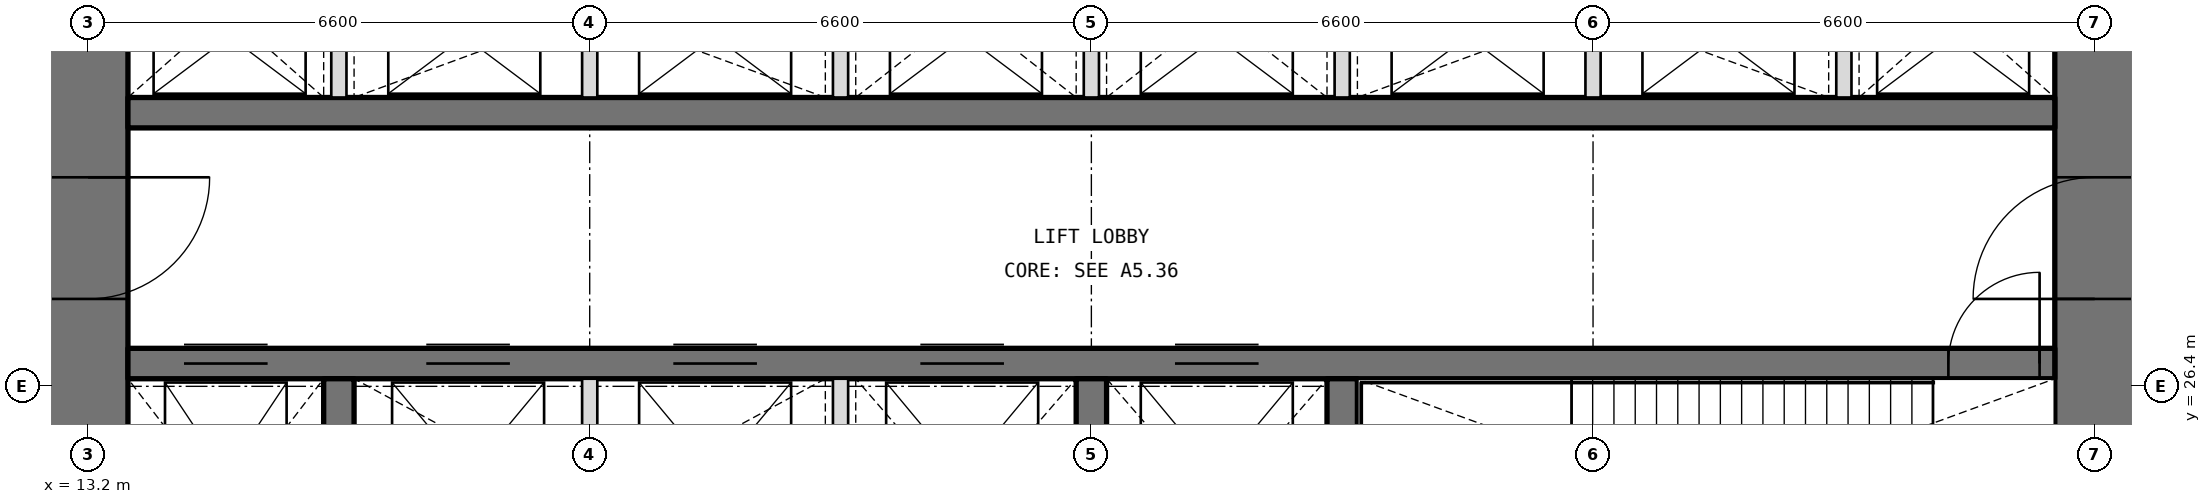
"""IFC4 building model, lengths in metres.
Left out: names, types, materials, properties, quantities, classifications, styles, units other than length and angle.
Written with IfcOpenShell. Run it as: python <this file> out.ifc"""

import sys

from ifc_helpers import new_model, si_unit, direction, frame, frame_2d, origin, place, context, subcontext, project, spatial, rectangle, extrude, element, fill, save


model = new_model("IFC4")
c1 = context("Model", 3, precision=1e-05, world=origin(), true_north=direction((0.0, 1.0)))
c2 = subcontext(c1, "Body", "Model", "MODEL_VIEW")
j1 = project(units=[si_unit("LENGTHUNIT", "METRE"), si_unit("PLANEANGLEUNIT", "RADIAN")], contexts=[c1])
p1 = place(None, origin())
s1 = spatial("IfcSite", under=j1, at=p1, CompositionType="ELEMENT")
p2 = place(p1, origin())
s2 = spatial("IfcBuilding", under=s1, at=p2, CompositionType="ELEMENT")
p3 = place(p2, frame((0.0, 0.0, 149.4)))
s3 = spatial("IfcBuildingStorey", under=s2, at=p3, CompositionType="ELEMENT", Elevation=149.4)
p4 = place(p3, frame((39.6, 13.725, 0.0), z_axis=(0.0, 0.0, 1.0), x_axis=(0.0, 1.0, 0.0)))
e1 = element("IfcWall", 1, at=p4, inside=s3, PredefinedType="SHEAR", context=c2, shape_type="SweptSolid", body=[
    extrude(rectangle(XDim=18.75, YDim=1.05, at=frame_2d((9.375, 0.0))), origin(), (0.0, 0.0, 1.0), 6.3),
])
p5 = place(p4, frame((3.025, 0.0, 0.0)))
e2 = element("IfcOpeningElement", 2, at=p5, cuts=e1, PredefinedType="OPENING", context=c2, shape_type="SweptSolid", body=[
    extrude(rectangle(XDim=1.6, YDim=2.1, at=frame_2d((0.8, 1.05))), frame((0.0, 0.535, 0.0), z_axis=(0.0, -1.0, 0.0), x_axis=(1.0, 0.0, 0.0)), (0.0, 0.0, 1.0), 1.07),
])
p6 = place(p4, frame((13.825, 0.0, 0.0)))
e3 = element("IfcOpeningElement", 3, at=p6, cuts=e1, PredefinedType="OPENING", context=c2, shape_type="SweptSolid", body=[
    extrude(rectangle(XDim=1.6, YDim=2.1, at=frame_2d((0.8, 1.05))), frame((0.0, 0.535, 0.0), z_axis=(0.0, -1.0, 0.0), x_axis=(1.0, 0.0, 0.0)), (0.0, 0.0, 1.0), 1.07),
])
p7 = place(p3, frame((13.2, 32.475, 0.0), z_axis=(0.0, 0.0, 1.0), x_axis=(0.0, -1.0, 0.0)))
e4 = element("IfcWall", 4, at=p7, inside=s3, PredefinedType="SHEAR", context=c2, shape_type="SweptSolid", body=[
    extrude(rectangle(XDim=18.75, YDim=1.05, at=frame_2d((9.375, 0.0))), origin(), (0.0, 0.0, 1.0), 6.3),
])
p8 = place(p7, frame((14.125, 0.0, 0.0)))
e5 = element("IfcOpeningElement", 5, at=p8, cuts=e4, PredefinedType="OPENING", context=c2, shape_type="SweptSolid", body=[
    extrude(rectangle(XDim=1.6, YDim=2.1, at=frame_2d((0.8, 1.05))), frame((0.0, 0.535, 0.0), z_axis=(0.0, -1.0, 0.0), x_axis=(1.0, 0.0, 0.0)), (0.0, 0.0, 1.0), 1.07),
])
p9 = place(p7, frame((3.325, 0.0, 0.0)))
e6 = element("IfcOpeningElement", 6, at=p9, cuts=e4, PredefinedType="OPENING", context=c2, shape_type="SweptSolid", body=[
    extrude(rectangle(XDim=1.6, YDim=2.1, at=frame_2d((0.8, 1.05))), frame((0.0, 0.535, 0.0), z_axis=(0.0, -1.0, 0.0), x_axis=(1.0, 0.0, 0.0)), (0.0, 0.0, 1.0), 1.07),
])
p10 = place(p3, frame((13.725, 26.7, 0.0), z_axis=(0.0, 0.0, 1.0), x_axis=(1.0, 0.0, 0.0)))
e7 = element("IfcWall", 7, at=p10, inside=s3, PredefinedType="SHEAR", context=c2, shape_type="SweptSolid", body=[
    extrude(rectangle(XDim=25.35, YDim=0.4, at=frame_2d((12.675, 0.0))), origin(), (0.0, 0.0, 1.0), 6.3),
])
p11 = place(p10, frame((23.95, 0.0, 0.0)))
e8 = element("IfcOpeningElement", 8, at=p11, cuts=e7, PredefinedType="OPENING", context=c2, shape_type="SweptSolid", body=[
    extrude(rectangle(XDim=1.2, YDim=2.1, at=frame_2d((0.6, 1.05))), frame((0.0, 0.21, 0.0), z_axis=(0.0, -1.0, 0.0), x_axis=(1.0, 0.0, 0.0)), (0.0, 0.0, 1.0), 0.42),
])
p12 = place(p10, frame((0.738, 0.0, 0.0)))
e9 = element("IfcOpeningElement", 9, at=p12, cuts=e7, PredefinedType="OPENING", context=c2, shape_type="SweptSolid", body=[
    extrude(rectangle(XDim=1.1, YDim=2.1, at=frame_2d((0.55, 1.05))), frame((0.0, 0.21, 0.0), z_axis=(0.0, -1.0, 0.0), x_axis=(1.0, 0.0, 0.0)), (0.0, 0.0, 1.0), 0.42),
])
p13 = place(p10, frame((3.925, 0.0, 0.0)))
e10 = element("IfcOpeningElement", 10, at=p13, cuts=e7, PredefinedType="OPENING", context=c2, shape_type="SweptSolid", body=[
    extrude(rectangle(XDim=1.1, YDim=2.1, at=frame_2d((0.55, 1.05))), frame((0.0, 0.21, 0.0), z_axis=(0.0, -1.0, 0.0), x_axis=(1.0, 0.0, 0.0)), (0.0, 0.0, 1.0), 0.42),
])
p14 = place(p10, frame((7.175, 0.0, 0.0)))
e11 = element("IfcOpeningElement", 11, at=p14, cuts=e7, PredefinedType="OPENING", context=c2, shape_type="SweptSolid", body=[
    extrude(rectangle(XDim=1.1, YDim=2.1, at=frame_2d((0.55, 1.05))), frame((0.0, 0.21, 0.0), z_axis=(0.0, -1.0, 0.0), x_axis=(1.0, 0.0, 0.0)), (0.0, 0.0, 1.0), 0.42),
])
p15 = place(p10, frame((10.425, 0.0, 0.0)))
e12 = element("IfcOpeningElement", 12, at=p15, cuts=e7, PredefinedType="OPENING", context=c2, shape_type="SweptSolid", body=[
    extrude(rectangle(XDim=1.1, YDim=2.1, at=frame_2d((0.55, 1.05))), frame((0.0, 0.21, 0.0), z_axis=(0.0, -1.0, 0.0), x_axis=(1.0, 0.0, 0.0)), (0.0, 0.0, 1.0), 0.42),
])
p16 = place(p10, frame((13.775, 0.0, 0.0)))
e13 = element("IfcOpeningElement", 13, at=p16, cuts=e7, PredefinedType="OPENING", context=c2, shape_type="SweptSolid", body=[
    extrude(rectangle(XDim=1.1, YDim=2.1, at=frame_2d((0.55, 1.05))), frame((0.0, 0.21, 0.0), z_axis=(0.0, -1.0, 0.0), x_axis=(1.0, 0.0, 0.0)), (0.0, 0.0, 1.0), 0.42),
])
p17 = place(p3, frame((13.725, 30.0, 0.0), z_axis=(0.0, 0.0, 1.0), x_axis=(1.0, 0.0, 0.0)))
e14 = element("IfcWall", 14, at=p17, inside=s3, PredefinedType="SHEAR", context=c2, shape_type="SweptSolid", body=[
    extrude(rectangle(XDim=25.35, YDim=0.4, at=frame_2d((12.675, 0.0))), origin(), (0.0, 0.0, 1.0), 6.3),
])
for number, where, z_axis, x_axis in (
    (15, (16.5, 23.15, 0.0), (0.0, 0.0, 1.0), (0.0, 1.0, 0.0)),
    (16, (26.4, 23.15, 0.0), (0.0, 0.0, 1.0), (0.0, 1.0, 0.0)),
    (17, (29.7, 23.15, 0.0), (0.0, 0.0, 1.0), (0.0, 1.0, 0.0)),
):
    element("IfcWall", number, at=place(p3, frame(where, z_axis=z_axis, x_axis=x_axis)), inside=s3, PredefinedType="SHEAR", context=c2, shape_type="SweptSolid", body=[
        extrude(rectangle(XDim=3.35, YDim=0.4, at=frame_2d((1.675, 0.0))), origin(), (0.0, 0.0, 1.0), 6.3),
    ])
for number, where, z_axis, x_axis in (
    (18, (16.5, 30.2, 0.0), (0.0, 0.0, 1.0), (0.0, 1.0, 0.0)),
    (19, (19.8, 30.2, 0.0), (0.0, 0.0, 1.0), (0.0, 1.0, 0.0)),
    (20, (23.1, 30.2, 0.0), (0.0, 0.0, 1.0), (0.0, 1.0, 0.0)),
    (21, (26.4, 30.2, 0.0), (0.0, 0.0, 1.0), (0.0, 1.0, 0.0)),
    (22, (29.7, 30.2, 0.0), (0.0, 0.0, 1.0), (0.0, 1.0, 0.0)),
    (23, (33.0, 30.2, 0.0), (0.0, 0.0, 1.0), (0.0, 1.0, 0.0)),
    (24, (36.3, 30.2, 0.0), (0.0, 0.0, 1.0), (0.0, 1.0, 0.0)),
):
    element("IfcWall", number, at=place(p3, frame(where, z_axis=z_axis, x_axis=x_axis)), inside=s3, PredefinedType="PARTITIONING", context=c2, shape_type="SweptSolid", body=[
        extrude(rectangle(XDim=2.275, YDim=0.2, at=frame_2d((1.138, 0.0))), origin(), (0.0, 0.0, 1.0), 6.3),
    ])
for number, where, z_axis, x_axis in (
    (25, (19.8, 23.15, 0.0), (0.0, 0.0, 1.0), (0.0, 1.0, 0.0)),
    (26, (23.1, 23.15, 0.0), (0.0, 0.0, 1.0), (0.0, 1.0, 0.0)),
):
    element("IfcWall", number, at=place(p3, frame(where, z_axis=z_axis, x_axis=x_axis)), inside=s3, PredefinedType="PARTITIONING", context=c2, shape_type="SweptSolid", body=[
        extrude(rectangle(XDim=3.35, YDim=0.2, at=frame_2d((1.675, 0.0))), origin(), (0.0, 0.0, 1.0), 6.3),
    ])
p18 = place(p11, origin())
e27 = element("IfcDoor", 27, at=p18, inside=s3, OperationType="SINGLE_SWING_RIGHT", PredefinedType="DOOR", context=c2, shape_type="SweptSolid", body=[
    extrude(rectangle(XDim=1.2, YDim=2.1, at=frame_2d((0.6, 1.05))), frame((0.0, 0.025, 0.0), z_axis=(0.0, -1.0, 0.0), x_axis=(1.0, 0.0, 0.0)), (0.0, 0.0, 1.0), 0.05),
])
fill(e8, e27)
p19 = place(p9, origin())
e28 = element("IfcDoor", 28, at=p19, inside=s3, OperationType="DOUBLE_DOOR_DOUBLE_SWING", PredefinedType="DOOR", context=c2, shape_type="SweptSolid", body=[
    extrude(rectangle(XDim=1.6, YDim=2.1, at=frame_2d((0.8, 1.05))), frame((0.0, 0.025, 0.0), z_axis=(0.0, -1.0, 0.0), x_axis=(1.0, 0.0, 0.0)), (0.0, 0.0, 1.0), 0.05),
])
fill(e6, e28)
p20 = place(p6, origin())
e29 = element("IfcDoor", 29, at=p20, inside=s3, OperationType="DOUBLE_DOOR_DOUBLE_SWING", PredefinedType="DOOR", context=c2, shape_type="SweptSolid", body=[
    extrude(rectangle(XDim=1.6, YDim=2.1, at=frame_2d((0.8, 1.05))), frame((0.0, 0.025, 0.0), z_axis=(0.0, -1.0, 0.0), x_axis=(1.0, 0.0, 0.0)), (0.0, 0.0, 1.0), 0.05),
])
fill(e3, e29)
p21 = place(p12, origin())
e30 = element("IfcDoor", 30, at=p21, inside=s3, OperationType="DOUBLE_DOOR_SLIDING", PredefinedType="DOOR", context=c2, shape_type="SweptSolid", body=[
    extrude(rectangle(XDim=1.1, YDim=2.1, at=frame_2d((0.55, 1.05))), frame((0.0, 0.025, 0.0), z_axis=(0.0, -1.0, 0.0), x_axis=(1.0, 0.0, 0.0)), (0.0, 0.0, 1.0), 0.05),
])
fill(e9, e30)
p22 = place(p13, origin())
e31 = element("IfcDoor", 31, at=p22, inside=s3, OperationType="DOUBLE_DOOR_SLIDING", PredefinedType="DOOR", context=c2, shape_type="SweptSolid", body=[
    extrude(rectangle(XDim=1.1, YDim=2.1, at=frame_2d((0.55, 1.05))), frame((0.0, 0.025, 0.0), z_axis=(0.0, -1.0, 0.0), x_axis=(1.0, 0.0, 0.0)), (0.0, 0.0, 1.0), 0.05),
])
fill(e10, e31)
p23 = place(p14, origin())
e32 = element("IfcDoor", 32, at=p23, inside=s3, OperationType="DOUBLE_DOOR_SLIDING", PredefinedType="DOOR", context=c2, shape_type="SweptSolid", body=[
    extrude(rectangle(XDim=1.1, YDim=2.1, at=frame_2d((0.55, 1.05))), frame((0.0, 0.025, 0.0), z_axis=(0.0, -1.0, 0.0), x_axis=(1.0, 0.0, 0.0)), (0.0, 0.0, 1.0), 0.05),
])
fill(e11, e32)
p24 = place(p15, origin())
e33 = element("IfcDoor", 33, at=p24, inside=s3, OperationType="DOUBLE_DOOR_SLIDING", PredefinedType="DOOR", context=c2, shape_type="SweptSolid", body=[
    extrude(rectangle(XDim=1.1, YDim=2.1, at=frame_2d((0.55, 1.05))), frame((0.0, 0.025, 0.0), z_axis=(0.0, -1.0, 0.0), x_axis=(1.0, 0.0, 0.0)), (0.0, 0.0, 1.0), 0.05),
])
fill(e12, e33)
p25 = place(p16, origin())
e34 = element("IfcDoor", 34, at=p25, inside=s3, OperationType="DOUBLE_DOOR_SLIDING", PredefinedType="DOOR", context=c2, shape_type="SweptSolid", body=[
    extrude(rectangle(XDim=1.1, YDim=2.1, at=frame_2d((0.55, 1.05))), frame((0.0, 0.025, 0.0), z_axis=(0.0, -1.0, 0.0), x_axis=(1.0, 0.0, 0.0)), (0.0, 0.0, 1.0), 0.05),
])
fill(e13, e34)
save(model, sys.argv[1])
